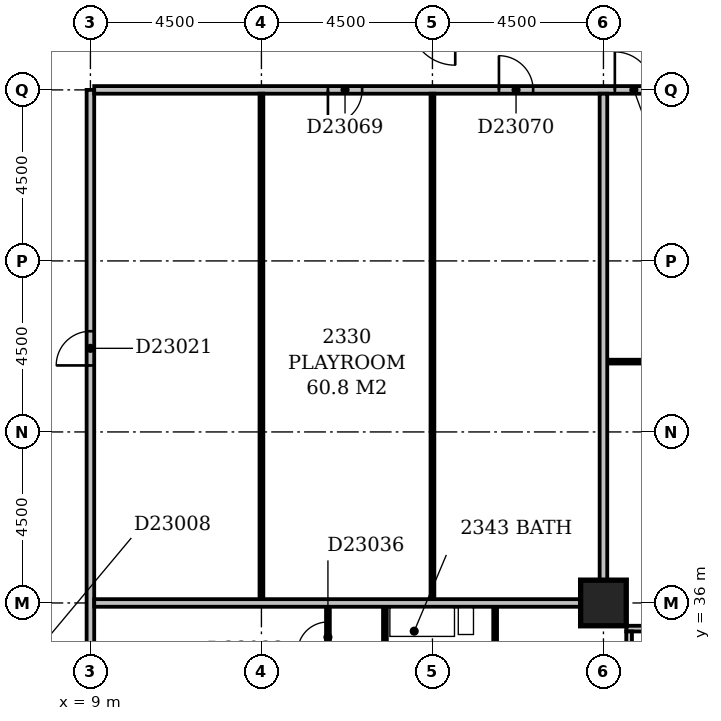
"""IFC4 building model, lengths in metres.
Left out: names, types, materials, properties, quantities, classifications, styles, units other than length and angle.
Written with IfcOpenShell. Run it as: python <this file> out.ifc"""

import sys

from ifc_helpers import new_model, si_unit, direction, frame, frame_2d, origin, origin_2d, place, context, subcontext, project, spatial, rectangle, extrude, element, fill, save


model = new_model("IFC4")
c1 = context("Model", 3, precision=1e-05, world=origin(), true_north=direction((0.0, 1.0)))
c2 = subcontext(c1, "Body", "Model", "MODEL_VIEW")
j1 = project(units=[si_unit("LENGTHUNIT", "METRE"), si_unit("PLANEANGLEUNIT", "RADIAN")], contexts=[c1])
p1 = place(None, origin())
s1 = spatial("IfcSite", under=j1, at=p1, CompositionType="ELEMENT")
p2 = place(p1, origin())
s2 = spatial("IfcBuilding", under=s1, at=p2, CompositionType="ELEMENT")
p3 = place(p2, frame((0.0, 0.0, 93.8)))
s3 = spatial("IfcBuildingStorey", under=s2, at=p3, CompositionType="ELEMENT", Elevation=93.8)
p4 = place(p3, frame((22.5, 36.0, -0.3), z_axis=(0.0, 0.0, 1.0), x_axis=(1.0, 0.0, 0.0)))
e1 = element("IfcColumn", 1, at=p4, inside=s3, PredefinedType="COLUMN", context=c2, shape_type="SweptSolid", body=[
    extrude(rectangle(XDim=1.2, YDim=1.2, at=origin_2d()), origin(), (0.0, 0.0, 1.0), 3.6),
])
p5 = place(p3, frame((23.175, 17.4, 0.0), z_axis=(0.0, 0.0, 1.0), x_axis=(0.0, 1.0, 0.0)))
e2 = element("IfcWall", 2, at=p5, inside=s3, PredefinedType="STANDARD", context=c2, shape_type="SweptSolid", body=[
    extrude(rectangle(XDim=17.85, YDim=0.15, at=frame_2d((8.925, 0.0))), origin(), (0.0, 0.0, 1.0), 2.7),
])
p6 = place(p5, frame((2.999, 0.0, 0.6)))
e3 = element("IfcOpeningElement", 3, at=p6, cuts=e2, PredefinedType="OPENING", context=c2, shape_type="SweptSolid", body=[
    extrude(rectangle(XDim=1.2, YDim=1.8, at=frame_2d((0.6, 0.9))), frame((0.0, 0.087, 0.0), z_axis=(0.0, -1.0, 0.0), x_axis=(1.0, 0.0, 0.0)), (0.0, 0.0, 1.0), 0.174),
])
p7 = place(p5, frame((6.15, 0.0, 0.6)))
e4 = element("IfcOpeningElement", 4, at=p7, cuts=e2, PredefinedType="OPENING", context=c2, shape_type="SweptSolid", body=[
    extrude(rectangle(XDim=2.4, YDim=1.8, at=frame_2d((1.2, 0.9))), frame((0.0, 0.087, 0.0), z_axis=(0.0, -1.0, 0.0), x_axis=(1.0, 0.0, 0.0)), (0.0, 0.0, 1.0), 0.174),
])
p8 = place(p5, frame((10.65, 0.0, 0.6)))
e5 = element("IfcOpeningElement", 5, at=p8, cuts=e2, PredefinedType="OPENING", context=c2, shape_type="SweptSolid", body=[
    extrude(rectangle(XDim=2.4, YDim=1.8, at=frame_2d((1.2, 0.9))), frame((0.0, 0.087, 0.0), z_axis=(0.0, -1.0, 0.0), x_axis=(1.0, 0.0, 0.0)), (0.0, 0.0, 1.0), 0.174),
])
p9 = place(p5, frame((15.043, 0.0, 0.6)))
e6 = element("IfcOpeningElement", 6, at=p9, cuts=e2, PredefinedType="OPENING", context=c2, shape_type="SweptSolid", body=[
    extrude(rectangle(XDim=2.1, YDim=1.8, at=frame_2d((1.05, 0.9))), frame((0.0, 0.087, 0.0), z_axis=(0.0, -1.0, 0.0), x_axis=(1.0, 0.0, 0.0)), (0.0, 0.0, 1.0), 0.174),
])
p10 = place(p3, frame((23.1, 35.325, 0.0), z_axis=(0.0, 0.0, 1.0), x_axis=(1.0, 0.0, 0.0)))
e7 = element("IfcWall", 7, at=p10, inside=s3, PredefinedType="STANDARD", context=c2, shape_type="SweptSolid", body=[
    extrude(rectangle(XDim=45.15, YDim=0.15, at=frame_2d((22.575, 0.0))), origin(), (0.0, 0.0, 1.0), 2.7),
])
p11 = place(p10, frame((2.185, 0.0, 0.6)))
e8 = element("IfcOpeningElement", 8, at=p11, cuts=e7, PredefinedType="OPENING", context=c2, shape_type="SweptSolid", body=[
    extrude(rectangle(XDim=0.9, YDim=1.8, at=frame_2d((0.45, 0.9))), frame((0.0, 0.087, 0.0), z_axis=(0.0, -1.0, 0.0), x_axis=(1.0, 0.0, 0.0)), (0.0, 0.0, 1.0), 0.174),
])
p12 = place(p10, frame((4.95, 0.0, 0.6)))
e9 = element("IfcOpeningElement", 9, at=p12, cuts=e7, PredefinedType="OPENING", context=c2, shape_type="SweptSolid", body=[
    extrude(rectangle(XDim=2.4, YDim=1.8, at=frame_2d((1.2, 0.9))), frame((0.0, 0.087, 0.0), z_axis=(0.0, -1.0, 0.0), x_axis=(1.0, 0.0, 0.0)), (0.0, 0.0, 1.0), 0.174),
])
p13 = place(p10, frame((9.45, 0.0, 0.6)))
e10 = element("IfcOpeningElement", 10, at=p13, cuts=e7, PredefinedType="OPENING", context=c2, shape_type="SweptSolid", body=[
    extrude(rectangle(XDim=2.4, YDim=1.8, at=frame_2d((1.2, 0.9))), frame((0.0, 0.087, 0.0), z_axis=(0.0, -1.0, 0.0), x_axis=(1.0, 0.0, 0.0)), (0.0, 0.0, 1.0), 0.174),
])
p14 = place(p10, frame((13.95, 0.0, 0.6)))
e11 = element("IfcOpeningElement", 11, at=p14, cuts=e7, PredefinedType="OPENING", context=c2, shape_type="SweptSolid", body=[
    extrude(rectangle(XDim=2.4, YDim=1.8, at=frame_2d((1.2, 0.9))), frame((0.0, 0.087, 0.0), z_axis=(0.0, -1.0, 0.0), x_axis=(1.0, 0.0, 0.0)), (0.0, 0.0, 1.0), 0.174),
])
p15 = place(p10, frame((18.45, 0.0, 0.6)))
e12 = element("IfcOpeningElement", 12, at=p15, cuts=e7, PredefinedType="OPENING", context=c2, shape_type="SweptSolid", body=[
    extrude(rectangle(XDim=2.4, YDim=1.8, at=frame_2d((1.2, 0.9))), frame((0.0, 0.087, 0.0), z_axis=(0.0, -1.0, 0.0), x_axis=(1.0, 0.0, 0.0)), (0.0, 0.0, 1.0), 0.174),
])
p16 = place(p10, frame((22.71, 0.0, 0.6)))
e13 = element("IfcOpeningElement", 13, at=p16, cuts=e7, PredefinedType="OPENING", context=c2, shape_type="SweptSolid", body=[
    extrude(rectangle(XDim=1.8, YDim=1.8, at=frame_2d((0.9, 0.9))), frame((0.0, 0.087, 0.0), z_axis=(0.0, -1.0, 0.0), x_axis=(1.0, 0.0, 0.0)), (0.0, 0.0, 1.0), 0.174),
])
p17 = place(p10, frame((28.859, 0.0, 0.6)))
e14 = element("IfcOpeningElement", 14, at=p17, cuts=e7, PredefinedType="OPENING", context=c2, shape_type="SweptSolid", body=[
    extrude(rectangle(XDim=1.2, YDim=1.8, at=frame_2d((0.6, 0.9))), frame((0.0, 0.087, 0.0), z_axis=(0.0, -1.0, 0.0), x_axis=(1.0, 0.0, 0.0)), (0.0, 0.0, 1.0), 0.174),
])
p18 = place(p10, frame((31.95, 0.0, 0.6)))
e15 = element("IfcOpeningElement", 15, at=p18, cuts=e7, PredefinedType="OPENING", context=c2, shape_type="SweptSolid", body=[
    extrude(rectangle(XDim=2.4, YDim=1.8, at=frame_2d((1.2, 0.9))), frame((0.0, 0.087, 0.0), z_axis=(0.0, -1.0, 0.0), x_axis=(1.0, 0.0, 0.0)), (0.0, 0.0, 1.0), 0.174),
])
p19 = place(p10, frame((36.45, 0.0, 0.6)))
e16 = element("IfcOpeningElement", 16, at=p19, cuts=e7, PredefinedType="OPENING", context=c2, shape_type="SweptSolid", body=[
    extrude(rectangle(XDim=2.4, YDim=1.8, at=frame_2d((1.2, 0.9))), frame((0.0, 0.087, 0.0), z_axis=(0.0, -1.0, 0.0), x_axis=(1.0, 0.0, 0.0)), (0.0, 0.0, 1.0), 0.174),
])
p20 = place(p10, frame((40.95, 0.0, 0.6)))
e17 = element("IfcOpeningElement", 17, at=p20, cuts=e7, PredefinedType="OPENING", context=c2, shape_type="SweptSolid", body=[
    extrude(rectangle(XDim=2.4, YDim=1.8, at=frame_2d((1.2, 0.9))), frame((0.0, 0.087, 0.0), z_axis=(0.0, -1.0, 0.0), x_axis=(1.0, 0.0, 0.0)), (0.0, 0.0, 1.0), 0.174),
])
p21 = place(p3, frame((9.0, 5.0, 0.0), z_axis=(0.0, 0.0, 1.0), x_axis=(0.0, 1.0, 0.0)))
e18 = element("IfcWall", 18, at=p21, inside=s3, PredefinedType="PARTITIONING", context=c2, shape_type="SweptSolid", body=[
    extrude(rectangle(XDim=44.5, YDim=0.2, at=frame_2d((22.25, 0.0))), origin(), (0.0, 0.0, 1.0), 3.3),
])
p22 = place(p21, frame((18.4, 0.0, 0.0)))
e19 = element("IfcOpeningElement", 19, at=p22, cuts=e18, PredefinedType="OPENING", context=c2, shape_type="SweptSolid", body=[
    extrude(rectangle(XDim=1.0, YDim=2.1, at=frame_2d((0.5, 1.05))), frame((0.0, 0.112, 0.0), z_axis=(0.0, -1.0, 0.0), x_axis=(1.0, 0.0, 0.0)), (0.0, 0.0, 1.0), 0.224),
])
p23 = place(p21, frame((11.7, 0.0, 0.0)))
e20 = element("IfcOpeningElement", 20, at=p23, cuts=e18, PredefinedType="OPENING", context=c2, shape_type="SweptSolid", body=[
    extrude(rectangle(XDim=1.0, YDim=2.1, at=frame_2d((0.5, 1.05))), frame((0.0, 0.112, 0.0), z_axis=(0.0, -1.0, 0.0), x_axis=(1.0, 0.0, 0.0)), (0.0, 0.0, 1.0), 0.224),
])
p24 = place(p21, frame((37.25, 0.0, 0.0)))
e21 = element("IfcOpeningElement", 21, at=p24, cuts=e18, PredefinedType="OPENING", context=c2, shape_type="SweptSolid", body=[
    extrude(rectangle(XDim=0.9, YDim=2.1, at=frame_2d((0.45, 1.05))), frame((0.0, 0.112, 0.0), z_axis=(0.0, -1.0, 0.0), x_axis=(1.0, 0.0, 0.0)), (0.0, 0.0, 1.0), 0.224),
])
p25 = place(p21, frame((1.5, 0.0, 0.0)))
e22 = element("IfcOpeningElement", 22, at=p25, cuts=e18, PredefinedType="OPENING", context=c2, shape_type="SweptSolid", body=[
    extrude(rectangle(XDim=0.9, YDim=2.1, at=frame_2d((0.45, 1.05))), frame((0.0, 0.112, 0.0), z_axis=(0.0, -1.0, 0.0), x_axis=(1.0, 0.0, 0.0)), (0.0, 0.0, 1.0), 0.224),
])
p26 = place(p3, frame((16.75, 18.1, 0.0), z_axis=(0.0, 0.0, 1.0), x_axis=(0.0, 1.0, 0.0)))
e23 = element("IfcWall", 23, at=p26, inside=s3, PredefinedType="PARTITIONING", context=c2, shape_type="SweptSolid", body=[
    extrude(rectangle(XDim=17.8, YDim=0.1, at=frame_2d((8.9, 0.0))), origin(), (0.0, 0.0, 1.0), 3.3),
])
p27 = place(p26, frame((3.9, 0.0, 0.0)))
e24 = element("IfcOpeningElement", 24, at=p27, cuts=e23, PredefinedType="OPENING", context=c2, shape_type="SweptSolid", body=[
    extrude(rectangle(XDim=0.9, YDim=2.1, at=frame_2d((0.45, 1.05))), frame((0.0, 0.062, 0.0), z_axis=(0.0, -1.0, 0.0), x_axis=(1.0, 0.0, 0.0)), (0.0, 0.0, 1.0), 0.124),
])
p28 = place(p26, frame((10.7, 0.0, 0.0)))
e25 = element("IfcOpeningElement", 25, at=p28, cuts=e23, PredefinedType="OPENING", context=c2, shape_type="SweptSolid", body=[
    extrude(rectangle(XDim=0.9, YDim=2.1, at=frame_2d((0.45, 1.05))), frame((0.0, 0.062, 0.0), z_axis=(0.0, -1.0, 0.0), x_axis=(1.0, 0.0, 0.0)), (0.0, 0.0, 1.0), 0.124),
])
p29 = place(p26, frame((14.05, 0.0, 0.0)))
e26 = element("IfcOpeningElement", 26, at=p29, cuts=e23, PredefinedType="OPENING", context=c2, shape_type="SweptSolid", body=[
    extrude(rectangle(XDim=0.9, YDim=2.1, at=frame_2d((0.45, 1.05))), frame((0.0, 0.062, 0.0), z_axis=(0.0, -1.0, 0.0), x_axis=(1.0, 0.0, 0.0)), (0.0, 0.0, 1.0), 0.124),
])
p30 = place(p3, frame((15.25, 24.7, 0.0), z_axis=(0.0, 0.0, 1.0), x_axis=(0.0, 1.0, 0.0)))
e27 = element("IfcWall", 27, at=p30, inside=s3, PredefinedType="PARTITIONING", context=c2, shape_type="SweptSolid", body=[
    extrude(rectangle(XDim=11.2, YDim=0.1, at=frame_2d((5.6, 0.0))), origin(), (0.0, 0.0, 1.0), 3.3),
])
p31 = place(p30, frame((0.8, 0.0, 0.0)))
e28 = element("IfcOpeningElement", 28, at=p31, cuts=e27, PredefinedType="OPENING", context=c2, shape_type="SweptSolid", body=[
    extrude(rectangle(XDim=0.8, YDim=2.1, at=frame_2d((0.4, 1.05))), frame((0.0, 0.062, 0.0), z_axis=(0.0, -1.0, 0.0), x_axis=(1.0, 0.0, 0.0)), (0.0, 0.0, 1.0), 0.124),
])
p32 = place(p30, frame((8.1, 0.0, 0.0)))
e29 = element("IfcOpeningElement", 29, at=p32, cuts=e27, PredefinedType="OPENING", context=c2, shape_type="SweptSolid", body=[
    extrude(rectangle(XDim=0.8, YDim=2.1, at=frame_2d((0.4, 1.05))), frame((0.0, 0.062, 0.0), z_axis=(0.0, -1.0, 0.0), x_axis=(1.0, 0.0, 0.0)), (0.0, 0.0, 1.0), 0.124),
])
p33 = place(p30, frame((4.3, 0.0, 0.0)))
e30 = element("IfcOpeningElement", 30, at=p33, cuts=e27, PredefinedType="OPENING", context=c2, shape_type="SweptSolid", body=[
    extrude(rectangle(XDim=0.8, YDim=2.1, at=frame_2d((0.4, 1.05))), frame((0.0, 0.062, 0.0), z_axis=(0.0, -1.0, 0.0), x_axis=(1.0, 0.0, 0.0)), (0.0, 0.0, 1.0), 0.124),
])
p34 = place(p30, frame((6.1, 0.0, 0.0)))
e31 = element("IfcOpeningElement", 31, at=p34, cuts=e27, PredefinedType="OPENING", context=c2, shape_type="SweptSolid", body=[
    extrude(rectangle(XDim=0.8, YDim=2.1, at=frame_2d((0.4, 1.05))), frame((0.0, 0.062, 0.0), z_axis=(0.0, -1.0, 0.0), x_axis=(1.0, 0.0, 0.0)), (0.0, 0.0, 1.0), 0.124),
])
p35 = place(p30, frame((10.0, 0.0, 0.0)))
e32 = element("IfcOpeningElement", 32, at=p35, cuts=e27, PredefinedType="OPENING", context=c2, shape_type="SweptSolid", body=[
    extrude(rectangle(XDim=0.8, YDim=2.1, at=frame_2d((0.4, 1.05))), frame((0.0, 0.062, 0.0), z_axis=(0.0, -1.0, 0.0), x_axis=(1.0, 0.0, 0.0)), (0.0, 0.0, 1.0), 0.124),
])
p36 = place(p30, frame((2.75, 0.0, 0.0)))
e33 = element("IfcOpeningElement", 33, at=p36, cuts=e27, PredefinedType="OPENING", context=c2, shape_type="SweptSolid", body=[
    extrude(rectangle(XDim=0.8, YDim=2.1, at=frame_2d((0.4, 1.05))), frame((0.0, 0.062, 0.0), z_axis=(0.0, -1.0, 0.0), x_axis=(1.0, 0.0, 0.0)), (0.0, 0.0, 1.0), 0.124),
])
p37 = place(p3, frame((19.65, 33.7, 0.0), z_axis=(0.0, 0.0, 1.0), x_axis=(0.0, 1.0, 0.0)))
e34 = element("IfcWall", 34, at=p37, inside=s3, PredefinedType="PLUMBINGWALL", context=c2, shape_type="SweptSolid", body=[
    extrude(rectangle(XDim=2.2, YDim=0.1, at=frame_2d((1.1, 0.0))), origin(), (0.0, 0.0, 1.0), 3.3),
])
p38 = place(p3, frame((9.1, 36.0, 0.0), z_axis=(0.0, 0.0, 1.0), x_axis=(1.0, 0.0, 0.0)))
e35 = element("IfcWall", 35, at=p38, inside=s3, PredefinedType="PARTITIONING", context=c2, shape_type="SweptSolid", body=[
    extrude(rectangle(XDim=12.8, YDim=0.2, at=frame_2d((6.4, 0.0))), origin(), (0.0, 0.0, 1.0), 2.4),
])
for number, where, z_axis, x_axis in (
    (36, (13.5, 36.1, 0.0), (0.0, 0.0, 1.0), (0.0, 1.0, 0.0)),
    (37, (18.0, 36.1, 0.0), (0.0, 0.0, 1.0), (0.0, 1.0, 0.0)),
):
    element("IfcWall", number, at=place(p3, frame(where, z_axis=z_axis, x_axis=x_axis)), inside=s3, PredefinedType="PARTITIONING", context=c2, shape_type="SweptSolid", body=[
        extrude(rectangle(XDim=13.3, YDim=0.1, at=frame_2d((6.65, 0.0))), origin(), (0.0, 0.0, 1.0), 3.3),
    ])
p39 = place(p3, frame((22.5, 36.6, 0.0), z_axis=(0.0, 0.0, 1.0), x_axis=(0.0, 1.0, 0.0)))
e38 = element("IfcWall", 38, at=p39, inside=s3, PredefinedType="PARTITIONING", context=c2, shape_type="SweptSolid", body=[
    extrude(rectangle(XDim=12.8, YDim=0.2, at=frame_2d((6.4, 0.0))), origin(), (0.0, 0.0, 1.0), 3.3),
])
p40 = place(p3, frame((22.6, 42.35, 0.0), z_axis=(0.0, 0.0, 1.0), x_axis=(1.0, 0.0, 0.0)))
e39 = element("IfcWall", 39, at=p40, inside=s3, PredefinedType="PARTITIONING", context=c2, shape_type="SweptSolid", body=[
    extrude(rectangle(XDim=17.8, YDim=0.1, at=frame_2d((8.9, 0.0))), origin(), (0.0, 0.0, 1.0), 3.3),
])
p41 = place(p40, frame((1.7, 0.0, 0.0)))
e40 = element("IfcOpeningElement", 40, at=p41, cuts=e39, PredefinedType="OPENING", context=c2, shape_type="SweptSolid", body=[
    extrude(rectangle(XDim=0.9, YDim=2.1, at=frame_2d((0.45, 1.05))), frame((0.0, 0.062, 0.0), z_axis=(0.0, -1.0, 0.0), x_axis=(1.0, 0.0, 0.0)), (0.0, 0.0, 1.0), 0.124),
])
p42 = place(p40, frame((6.2, 0.0, 0.0)))
e41 = element("IfcOpeningElement", 41, at=p42, cuts=e39, PredefinedType="OPENING", context=c2, shape_type="SweptSolid", body=[
    extrude(rectangle(XDim=0.9, YDim=2.1, at=frame_2d((0.45, 1.05))), frame((0.0, 0.062, 0.0), z_axis=(0.0, -1.0, 0.0), x_axis=(1.0, 0.0, 0.0)), (0.0, 0.0, 1.0), 0.124),
])
p43 = place(p40, frame((10.7, 0.0, 0.0)))
e42 = element("IfcOpeningElement", 42, at=p43, cuts=e39, PredefinedType="OPENING", context=c2, shape_type="SweptSolid", body=[
    extrude(rectangle(XDim=0.9, YDim=2.1, at=frame_2d((0.45, 1.05))), frame((0.0, 0.062, 0.0), z_axis=(0.0, -1.0, 0.0), x_axis=(1.0, 0.0, 0.0)), (0.0, 0.0, 1.0), 0.124),
])
p44 = place(p40, frame((15.2, 0.0, 0.0)))
e43 = element("IfcOpeningElement", 43, at=p44, cuts=e39, PredefinedType="OPENING", context=c2, shape_type="SweptSolid", body=[
    extrude(rectangle(XDim=0.9, YDim=2.1, at=frame_2d((0.45, 1.05))), frame((0.0, 0.062, 0.0), z_axis=(0.0, -1.0, 0.0), x_axis=(1.0, 0.0, 0.0)), (0.0, 0.0, 1.0), 0.124),
])
p45 = place(p3, frame((9.1, 49.5, 0.0), z_axis=(0.0, 0.0, 1.0), x_axis=(1.0, 0.0, 0.0)))
e44 = element("IfcWall", 44, at=p45, inside=s3, PredefinedType="PARTITIONING", context=c2, shape_type="SweptSolid", body=[
    extrude(rectangle(XDim=57.8, YDim=0.2, at=frame_2d((28.9, 0.0))), origin(), (0.0, 0.0, 1.0), 3.3),
])
p46 = place(p45, frame((13.7, 0.0, 0.0)))
e45 = element("IfcOpeningElement", 45, at=p46, cuts=e44, PredefinedType="OPENING", context=c2, shape_type="SweptSolid", body=[
    extrude(rectangle(XDim=1.0, YDim=2.1, at=frame_2d((0.5, 1.05))), frame((0.0, 0.112, 0.0), z_axis=(0.0, -1.0, 0.0), x_axis=(1.0, 0.0, 0.0)), (0.0, 0.0, 1.0), 0.224),
])
p47 = place(p45, frame((38.6, 0.0, 0.0)))
e46 = element("IfcOpeningElement", 46, at=p47, cuts=e44, PredefinedType="OPENING", context=c2, shape_type="SweptSolid", body=[
    extrude(rectangle(XDim=1.0, YDim=2.1, at=frame_2d((0.5, 1.05))), frame((0.0, 0.112, 0.0), z_axis=(0.0, -1.0, 0.0), x_axis=(1.0, 0.0, 0.0)), (0.0, 0.0, 1.0), 0.224),
])
p48 = place(p45, frame((52.1, 0.0, 0.0)))
e47 = element("IfcOpeningElement", 47, at=p48, cuts=e44, PredefinedType="OPENING", context=c2, shape_type="SweptSolid", body=[
    extrude(rectangle(XDim=1.0, YDim=2.1, at=frame_2d((0.5, 1.05))), frame((0.0, 0.112, 0.0), z_axis=(0.0, -1.0, 0.0), x_axis=(1.0, 0.0, 0.0)), (0.0, 0.0, 1.0), 0.224),
])
p49 = place(p45, frame((6.15, 0.0, 0.0)))
e48 = element("IfcOpeningElement", 48, at=p49, cuts=e44, PredefinedType="OPENING", context=c2, shape_type="SweptSolid", body=[
    extrude(rectangle(XDim=0.9, YDim=2.1, at=frame_2d((0.45, 1.05))), frame((0.0, 0.112, 0.0), z_axis=(0.0, -1.0, 0.0), x_axis=(1.0, 0.0, 0.0)), (0.0, 0.0, 1.0), 0.224),
])
p50 = place(p45, frame((10.65, 0.0, 0.0)))
e49 = element("IfcOpeningElement", 49, at=p50, cuts=e44, PredefinedType="OPENING", context=c2, shape_type="SweptSolid", body=[
    extrude(rectangle(XDim=0.9, YDim=2.1, at=frame_2d((0.45, 1.05))), frame((0.0, 0.112, 0.0), z_axis=(0.0, -1.0, 0.0), x_axis=(1.0, 0.0, 0.0)), (0.0, 0.0, 1.0), 0.224),
])
p51 = place(p24, origin())
e50 = element("IfcDoor", 50, at=p51, inside=s3, OperationType="SINGLE_SWING_LEFT", PredefinedType="DOOR", context=c2, shape_type="SweptSolid", body=[
    extrude(rectangle(XDim=0.9, YDim=2.1, at=frame_2d((0.45, 1.05))), frame((0.0, 0.025, 0.0), z_axis=(0.0, -1.0, 0.0), x_axis=(1.0, 0.0, 0.0)), (0.0, 0.0, 1.0), 0.05),
])
fill(e21, e50)
p52 = place(p35, origin())
e51 = element("IfcDoor", 51, at=p52, inside=s3, OperationType="SINGLE_SWING_LEFT", PredefinedType="DOOR", context=c2, shape_type="SweptSolid", body=[
    extrude(rectangle(XDim=0.8, YDim=2.1, at=frame_2d((0.4, 1.05))), frame((0.0, 0.025, 0.0), z_axis=(0.0, -1.0, 0.0), x_axis=(1.0, 0.0, 0.0)), (0.0, 0.0, 1.0), 0.05),
])
fill(e32, e51)
p53 = place(p46, origin())
e52 = element("IfcDoor", 52, at=p53, inside=s3, OperationType="SINGLE_SWING_LEFT", PredefinedType="DOOR", context=c2, shape_type="SweptSolid", body=[
    extrude(rectangle(XDim=1.0, YDim=2.1, at=frame_2d((0.5, 1.05))), frame((0.0, 0.025, 0.0), z_axis=(0.0, -1.0, 0.0), x_axis=(1.0, 0.0, 0.0)), (0.0, 0.0, 1.0), 0.05),
])
fill(e45, e52)
p54 = place(p49, frame((0.9, 0.0, 0.0), z_axis=(0.0, 0.0, 1.0), x_axis=(-1.0, 0.0, 0.0)))
e53 = element("IfcDoor", 53, at=p54, inside=s3, OperationType="SINGLE_SWING_RIGHT", PredefinedType="DOOR", context=c2, shape_type="SweptSolid", body=[
    extrude(rectangle(XDim=0.9, YDim=2.1, at=frame_2d((0.45, 1.05))), frame((0.0, 0.025, 0.0), z_axis=(0.0, -1.0, 0.0), x_axis=(1.0, 0.0, 0.0)), (0.0, 0.0, 1.0), 0.05),
])
fill(e48, e53)
p55 = place(p50, origin())
e54 = element("IfcDoor", 54, at=p55, inside=s3, OperationType="SINGLE_SWING_LEFT", PredefinedType="DOOR", context=c2, shape_type="SweptSolid", body=[
    extrude(rectangle(XDim=0.9, YDim=2.1, at=frame_2d((0.45, 1.05))), frame((0.0, 0.025, 0.0), z_axis=(0.0, -1.0, 0.0), x_axis=(1.0, 0.0, 0.0)), (0.0, 0.0, 1.0), 0.05),
])
fill(e49, e54)
save(model, sys.argv[1])
